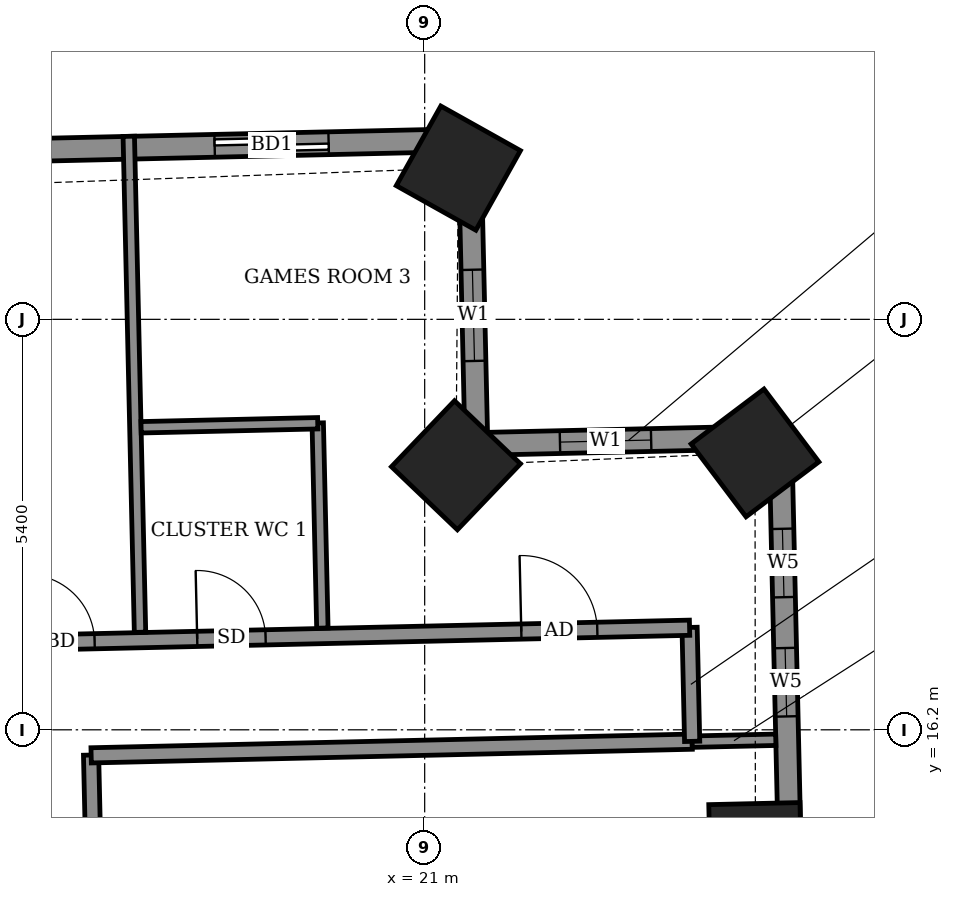
"""IFC4 building model, lengths in metres.
Left out: names, types, materials, properties, quantities, classifications, styles, units other than length and angle.
Written with IfcOpenShell. Run it as: python <this file> out.ifc"""

import sys

from ifc_helpers import new_model, si_unit, direction, frame, frame_2d, origin, origin_2d, place, context, subcontext, project, spatial, rectangle, extrude, element, fill, save


model = new_model("IFC4")
c1 = context("Model", 3, precision=1e-05, world=origin(), true_north=direction((0.0, 1.0)))
c2 = subcontext(c1, "Body", "Model", "MODEL_VIEW")
j1 = project(units=[si_unit("LENGTHUNIT", "METRE"), si_unit("PLANEANGLEUNIT", "RADIAN")], contexts=[c1])
p1 = place(None, origin())
s1 = spatial("IfcSite", under=j1, at=p1, CompositionType="ELEMENT")
p2 = place(p1, origin())
s2 = spatial("IfcBuilding", under=s1, at=p2, CompositionType="ELEMENT")
p3 = place(p2, frame((0.0, 0.0, 175.3)))
s3 = spatial("IfcBuildingStorey", under=s2, at=p3, CompositionType="ELEMENT", Elevation=175.3)
for number, where, z_axis, x_axis in (
    (1, (25.351, 14.629, -0.55), (0.0, 0.0, 1.0), (-0.023, 1.0, 0.0)),
    (2, (25.346, 19.843, -0.55), (0.0, 0.0, 1.0), (-0.602, 0.798, 0.0)),
    (3, (21.411, 19.68, -0.55), (0.0, 0.0, 1.0), (-0.723, 0.691, 0.0)),
    (4, (21.443, 23.589, -0.55), (0.0, 0.0, 1.0), (-0.873, 0.488, 0.0)),
):
    element("IfcColumn", number, at=place(p3, frame(where, z_axis=z_axis, x_axis=x_axis)), inside=s3, PredefinedType="COLUMN", context=c2, shape_type="SweptSolid", body=[
        extrude(rectangle(XDim=1.2, YDim=1.2, at=origin_2d()), origin(), (0.0, 0.0, 1.0), 3.6),
    ])
p4 = place(p3, frame((25.929, 9.025, 0.0), z_axis=(0.0, 0.0, 1.0), x_axis=(-0.022667601583, 0.999743056909, 0.0)))
e5 = element("IfcWall", 5, at=p4, inside=s3, PredefinedType="SOLIDWALL", context=c2, shape_type="SweptSolid", body=[
    extrude(rectangle(XDim=11.029, YDim=0.3, at=frame_2d((5.515, 0.0))), origin(), (0.0, 0.0, 1.0), 3.05),
])
p5 = place(p4, frame((2.086, 0.0, 0.0)))
e6 = element("IfcOpeningElement", 6, at=p5, cuts=e5, PredefinedType="OPENING", context=c2, shape_type="SweptSolid", body=[
    extrude(rectangle(XDim=1.5, YDim=2.4, at=frame_2d((0.75, 1.2))), frame((0.0, 0.16, 0.0), z_axis=(0.0, -1.0, 0.0), x_axis=(1.0, 0.0, 0.0)), (0.0, 0.0, 1.0), 0.32),
])
p6 = place(p4, frame((7.353, 0.0, 0.9)))
e7 = element("IfcOpeningElement", 7, at=p6, cuts=e5, PredefinedType="OPENING", context=c2, shape_type="SweptSolid", body=[
    extrude(rectangle(XDim=0.9, YDim=1.5, at=frame_2d((0.45, 0.75))), frame((0.0, 0.16, 0.0), z_axis=(0.0, -1.0, 0.0), x_axis=(1.0, 0.0, 0.0)), (0.0, 0.0, 1.0), 0.32),
])
p7 = place(p4, frame((8.922, 0.0, 0.9)))
e8 = element("IfcOpeningElement", 8, at=p7, cuts=e5, PredefinedType="OPENING", context=c2, shape_type="SweptSolid", body=[
    extrude(rectangle(XDim=0.9, YDim=1.5, at=frame_2d((0.45, 0.75))), frame((0.0, 0.16, 0.0), z_axis=(0.0, -1.0, 0.0), x_axis=(1.0, 0.0, 0.0)), (0.0, 0.0, 1.0), 0.32),
])
p8 = place(p3, frame((25.679, 20.051, 0.0), z_axis=(0.0, 0.0, 1.0), x_axis=(-0.999740826251, -0.022765770952, 0.0)))
e9 = element("IfcWall", 9, at=p8, inside=s3, PredefinedType="SOLIDWALL", context=c2, shape_type="SweptSolid", body=[
    extrude(rectangle(XDim=4.0, YDim=0.3, at=frame_2d((2.0, 0.0))), origin(), (0.0, 0.0, 1.0), 2.55),
])
p9 = place(p8, frame((1.7, 0.0, 0.9)))
e10 = element("IfcOpeningElement", 10, at=p9, cuts=e9, PredefinedType="OPENING", context=c2, shape_type="SweptSolid", body=[
    extrude(rectangle(XDim=1.2, YDim=1.5, at=frame_2d((0.6, 0.75))), frame((0.0, 0.16, 0.0), z_axis=(0.0, -1.0, 0.0), x_axis=(1.0, 0.0, 0.0)), (0.0, 0.0, 1.0), 0.32),
])
p10 = place(p3, frame((21.68, 19.96, 0.0), z_axis=(0.0, 0.0, 1.0), x_axis=(-0.022704768219, 0.999742213523, 0.0)))
e11 = element("IfcWall", 11, at=p10, inside=s3, PredefinedType="SOLIDWALL", context=c2, shape_type="SweptSolid", body=[
    extrude(rectangle(XDim=4.0, YDim=0.3, at=frame_2d((2.0, 0.0))), origin(), (0.0, 0.0, 1.0), 2.55),
])
p11 = place(p10, frame((1.093, 0.0, 0.9)))
e12 = element("IfcOpeningElement", 12, at=p11, cuts=e11, PredefinedType="OPENING", context=c2, shape_type="SweptSolid", body=[
    extrude(rectangle(XDim=1.2, YDim=1.5, at=frame_2d((0.6, 0.75))), frame((0.0, 0.16, 0.0), z_axis=(0.0, -1.0, 0.0), x_axis=(1.0, 0.0, 0.0)), (0.0, 0.0, 1.0), 0.32),
])
p12 = place(p3, frame((21.589, 23.959, 0.0), z_axis=(0.0, 0.0, 1.0), x_axis=(-0.999742671382, -0.022684598702, 0.0)))
e13 = element("IfcWall", 13, at=p12, inside=s3, PredefinedType="SOLIDWALL", context=c2, shape_type="SweptSolid", body=[
    extrude(rectangle(XDim=40.381, YDim=0.3, at=frame_2d((20.19, 0.0))), origin(), (0.0, 0.0, 1.0), 3.05),
])
p13 = place(p12, frame((1.853, 0.0, 0.0)))
e14 = element("IfcOpeningElement", 14, at=p13, cuts=e13, PredefinedType="OPENING", context=c2, shape_type="SweptSolid", body=[
    extrude(rectangle(XDim=1.5, YDim=2.4, at=frame_2d((0.75, 1.2))), frame((0.0, 0.16, 0.0), z_axis=(0.0, -1.0, 0.0), x_axis=(1.0, 0.0, 0.0)), (0.0, 0.0, 1.0), 0.32),
])
p14 = place(p12, frame((7.38, 0.0, 0.0)))
e15 = element("IfcOpeningElement", 15, at=p14, cuts=e13, PredefinedType="OPENING", context=c2, shape_type="SweptSolid", body=[
    extrude(rectangle(XDim=1.2, YDim=2.4, at=frame_2d((0.6, 1.2))), frame((0.0, 0.16, 0.0), z_axis=(0.0, -1.0, 0.0), x_axis=(1.0, 0.0, 0.0)), (0.0, 0.0, 1.0), 0.32),
])
p15 = place(p12, frame((10.27, 0.0, 0.0)))
e16 = element("IfcOpeningElement", 16, at=p15, cuts=e13, PredefinedType="OPENING", context=c2, shape_type="SweptSolid", body=[
    extrude(rectangle(XDim=1.5, YDim=2.4, at=frame_2d((0.75, 1.2))), frame((0.0, 0.16, 0.0), z_axis=(0.0, -1.0, 0.0), x_axis=(1.0, 0.0, 0.0)), (0.0, 0.0, 1.0), 0.32),
])
p16 = place(p12, frame((15.095, 0.0, 0.0)))
e17 = element("IfcOpeningElement", 17, at=p16, cuts=e13, PredefinedType="OPENING", context=c2, shape_type="SweptSolid", body=[
    extrude(rectangle(XDim=1.5, YDim=2.4, at=frame_2d((0.75, 1.2))), frame((0.0, 0.16, 0.0), z_axis=(0.0, -1.0, 0.0), x_axis=(1.0, 0.0, 0.0)), (0.0, 0.0, 1.0), 0.32),
])
p17 = place(p12, frame((20.935, 0.0, 0.0)))
e18 = element("IfcOpeningElement", 18, at=p17, cuts=e13, PredefinedType="OPENING", context=c2, shape_type="SweptSolid", body=[
    extrude(rectangle(XDim=1.2, YDim=2.4, at=frame_2d((0.6, 1.2))), frame((0.0, 0.16, 0.0), z_axis=(0.0, -1.0, 0.0), x_axis=(1.0, 0.0, 0.0)), (0.0, 0.0, 1.0), 0.32),
])
p18 = place(p12, frame((23.825, 0.0, 0.0)))
e19 = element("IfcOpeningElement", 19, at=p18, cuts=e13, PredefinedType="OPENING", context=c2, shape_type="SweptSolid", body=[
    extrude(rectangle(XDim=1.5, YDim=2.4, at=frame_2d((0.75, 1.2))), frame((0.0, 0.16, 0.0), z_axis=(0.0, -1.0, 0.0), x_axis=(1.0, 0.0, 0.0)), (0.0, 0.0, 1.0), 0.32),
])
p19 = place(p12, frame((28.65, 0.0, 0.0)))
e20 = element("IfcOpeningElement", 20, at=p19, cuts=e13, PredefinedType="OPENING", context=c2, shape_type="SweptSolid", body=[
    extrude(rectangle(XDim=1.5, YDim=2.4, at=frame_2d((0.75, 1.2))), frame((0.0, 0.16, 0.0), z_axis=(0.0, -1.0, 0.0), x_axis=(1.0, 0.0, 0.0)), (0.0, 0.0, 1.0), 0.32),
])
p20 = place(p12, frame((31.84, 0.0, 0.0)))
e21 = element("IfcOpeningElement", 21, at=p20, cuts=e13, PredefinedType="OPENING", context=c2, shape_type="SweptSolid", body=[
    extrude(rectangle(XDim=1.2, YDim=2.4, at=frame_2d((0.6, 1.2))), frame((0.0, 0.16, 0.0), z_axis=(0.0, -1.0, 0.0), x_axis=(1.0, 0.0, 0.0)), (0.0, 0.0, 1.0), 0.32),
])
p21 = place(p12, frame((36.57, 0.0, 0.9)))
e22 = element("IfcOpeningElement", 22, at=p21, cuts=e13, PredefinedType="OPENING", context=c2, shape_type="SweptSolid", body=[
    extrude(rectangle(XDim=2.4, YDim=1.5, at=frame_2d((1.2, 0.75))), frame((0.0, 0.16, 0.0), z_axis=(0.0, -1.0, 0.0), x_axis=(1.0, 0.0, 0.0)), (0.0, 0.0, 1.0), 0.32),
])
p22 = place(p3, frame((16.797, 7.674, 0.0), z_axis=(0.0, 0.0, 1.0), x_axis=(-0.022698399288, 0.999742358145, 0.0)))
e23 = element("IfcWall", 23, at=p22, inside=s3, PredefinedType="PARTITIONING", context=c2, shape_type="SweptSolid", body=[
    extrude(rectangle(XDim=8.196, YDim=0.2, at=frame_2d((4.098, 0.0))), origin(), (0.0, 0.0, 1.0), 3.05),
])
p23 = place(p22, frame((3.683, 0.0, 0.0)))
e24 = element("IfcOpeningElement", 24, at=p23, cuts=e23, PredefinedType="OPENING", context=c2, shape_type="SweptSolid", body=[
    extrude(rectangle(XDim=1.0, YDim=2.1, at=frame_2d((0.5, 1.05))), frame((0.0, 0.11, 0.0), z_axis=(0.0, -1.0, 0.0), x_axis=(1.0, 0.0, 0.0)), (0.0, 0.0, 1.0), 0.22),
])
p24 = place(p3, frame((16.612, 15.864, 0.0), z_axis=(0.0, 0.0, 1.0), x_axis=(0.999741181744, 0.022750154412, 0.0)))
e25 = element("IfcWall", 25, at=p24, inside=s3, PredefinedType="PARTITIONING", context=c2, shape_type="SweptSolid", body=[
    extrude(rectangle(XDim=7.909, YDim=0.2, at=frame_2d((3.955, 0.0))), origin(), (0.0, 0.0, 1.0), 3.05),
])
p25 = place(p3, frame((24.519, 16.044, 0.0), z_axis=(0.0, 0.0, 1.0), x_axis=(0.999738732953, 0.022857511541, 0.0)))
e26 = element("IfcWall", 26, at=p25, inside=s3, PredefinedType="PARTITIONING", context=c2, shape_type="SweptSolid", body=[
    extrude(rectangle(XDim=1.1, YDim=0.15, at=frame_2d((0.55, 0.0))), origin(), (0.0, 0.0, 1.0), 2.55),
])
p26 = place(p3, frame((24.519, 16.048, 0.0), z_axis=(0.0, 0.0, 1.0), x_axis=(-0.022632637625, 0.99974384905, 0.0)))
e27 = element("IfcWall", 27, at=p26, inside=s3, PredefinedType="PARTITIONING", context=c2, shape_type="SweptSolid", body=[
    extrude(rectangle(XDim=1.5, YDim=0.2, at=frame_2d((0.75, 0.0))), origin(), (0.0, 0.0, 1.0), 3.05),
])
p27 = place(p3, frame((14.88, 17.325, 0.0), z_axis=(0.0, 0.0, 1.0), x_axis=(0.999742504166, 0.022691966963, 0.0)))
e28 = element("IfcWall", 28, at=p27, inside=s3, PredefinedType="PARTITIONING", context=c2, shape_type="SweptSolid", body=[
    extrude(rectangle(XDim=9.608, YDim=0.2, at=frame_2d((4.804, 0.0))), origin(), (0.0, 0.0, 1.0), 3.05),
])
p28 = place(p27, frame((7.393, 0.0, 0.0)))
e29 = element("IfcOpeningElement", 29, at=p28, cuts=e28, PredefinedType="OPENING", context=c2, shape_type="SweptSolid", body=[
    extrude(rectangle(XDim=1.0, YDim=2.1, at=frame_2d((0.5, 1.05))), frame((0.0, 0.11, 0.0), z_axis=(0.0, -1.0, 0.0), x_axis=(1.0, 0.0, 0.0)), (0.0, 0.0, 1.0), 0.22),
])
p29 = place(p27, frame((3.128, 0.0, 0.0)))
e30 = element("IfcOpeningElement", 30, at=p29, cuts=e28, PredefinedType="OPENING", context=c2, shape_type="SweptSolid", body=[
    extrude(rectangle(XDim=0.9, YDim=2.1, at=frame_2d((0.45, 1.05))), frame((0.0, 0.11, 0.0), z_axis=(0.0, -1.0, 0.0), x_axis=(1.0, 0.0, 0.0)), (0.0, 0.0, 1.0), 0.22),
])
p30 = place(p27, frame((0.878, 0.0, 0.0)))
e31 = element("IfcOpeningElement", 31, at=p30, cuts=e28, PredefinedType="OPENING", context=c2, shape_type="SweptSolid", body=[
    extrude(rectangle(XDim=0.9, YDim=2.1, at=frame_2d((0.45, 1.05))), frame((0.0, 0.11, 0.0), z_axis=(0.0, -1.0, 0.0), x_axis=(1.0, 0.0, 0.0)), (0.0, 0.0, 1.0), 0.22),
])
p31 = place(p3, frame((17.255, 17.483, 0.0), z_axis=(0.0, 0.0, 1.0), x_axis=(-0.022667874761, 0.999743050715, 0.0)))
e32 = element("IfcWall", 32, at=p31, inside=s3, PredefinedType="PARTITIONING", context=c2, shape_type="SweptSolid", body=[
    extrude(rectangle(XDim=6.527, YDim=0.15, at=frame_2d((3.263, 0.0))), origin(), (0.0, 0.0, 1.0), 2.55),
])
p32 = place(p3, frame((19.654, 17.538, 0.0), z_axis=(0.0, 0.0, 1.0), x_axis=(-0.02260842146, 0.999744396973, 0.0)))
e33 = element("IfcWall", 33, at=p32, inside=s3, PredefinedType="PARTITIONING", context=c2, shape_type="SweptSolid", body=[
    extrude(rectangle(XDim=2.7, YDim=0.15, at=frame_2d((1.35, 0.0))), origin(), (0.0, 0.0, 1.0), 3.05),
])
p33 = place(p3, frame((17.269, 20.18, 0.0), z_axis=(0.0, 0.0, 1.0), x_axis=(0.999740260747, 0.02279059109, 0.0)))
e34 = element("IfcWall", 34, at=p33, inside=s3, PredefinedType="PARTITIONING", context=c2, shape_type="SweptSolid", body=[
    extrude(rectangle(XDim=2.324, YDim=0.15, at=frame_2d((1.162, 0.0))), origin(), (0.0, 0.0, 1.0), 3.05),
])
p34 = place(p6, origin())
e35 = element("IfcWindow", 35, at=p34, inside=s3, PartitioningType="SINGLE_PANEL", PredefinedType="WINDOW", context=c2, shape_type="SweptSolid", body=[
    extrude(rectangle(XDim=0.9, YDim=1.5, at=frame_2d((0.45, 0.75))), frame((0.0, 0.03, 0.0), z_axis=(0.0, -1.0, 0.0), x_axis=(1.0, 0.0, 0.0)), (0.0, 0.0, 1.0), 0.06),
])
fill(e7, e35)
p35 = place(p7, origin())
e36 = element("IfcWindow", 36, at=p35, inside=s3, PartitioningType="SINGLE_PANEL", PredefinedType="WINDOW", context=c2, shape_type="SweptSolid", body=[
    extrude(rectangle(XDim=0.9, YDim=1.5, at=frame_2d((0.45, 0.75))), frame((0.0, 0.03, 0.0), z_axis=(0.0, -1.0, 0.0), x_axis=(1.0, 0.0, 0.0)), (0.0, 0.0, 1.0), 0.06),
])
fill(e8, e36)
p36 = place(p9, origin())
e37 = element("IfcWindow", 37, at=p36, inside=s3, PartitioningType="SINGLE_PANEL", PredefinedType="WINDOW", context=c2, shape_type="SweptSolid", body=[
    extrude(rectangle(XDim=1.2, YDim=1.5, at=frame_2d((0.6, 0.75))), frame((0.0, 0.03, 0.0), z_axis=(0.0, -1.0, 0.0), x_axis=(1.0, 0.0, 0.0)), (0.0, 0.0, 1.0), 0.06),
])
fill(e10, e37)
p37 = place(p11, origin())
e38 = element("IfcWindow", 38, at=p37, inside=s3, PartitioningType="SINGLE_PANEL", PredefinedType="WINDOW", context=c2, shape_type="SweptSolid", body=[
    extrude(rectangle(XDim=1.2, YDim=1.5, at=frame_2d((0.6, 0.75))), frame((0.0, 0.03, 0.0), z_axis=(0.0, -1.0, 0.0), x_axis=(1.0, 0.0, 0.0)), (0.0, 0.0, 1.0), 0.06),
])
fill(e12, e38)
p38 = place(p13, origin())
e39 = element("IfcDoor", 39, at=p38, inside=s3, OperationType="SLIDING_TO_LEFT", PredefinedType="DOOR", context=c2, shape_type="SweptSolid", body=[
    extrude(rectangle(XDim=1.5, YDim=2.4, at=frame_2d((0.75, 1.2))), frame((0.0, 0.025, 0.0), z_axis=(0.0, -1.0, 0.0), x_axis=(1.0, 0.0, 0.0)), (0.0, 0.0, 1.0), 0.05),
])
fill(e14, e39)
p39 = place(p28, origin())
e40 = element("IfcDoor", 40, at=p39, inside=s3, OperationType="SINGLE_SWING_LEFT", PredefinedType="DOOR", context=c2, shape_type="SweptSolid", body=[
    extrude(rectangle(XDim=1.0, YDim=2.1, at=frame_2d((0.5, 1.05))), frame((0.0, 0.025, 0.0), z_axis=(0.0, -1.0, 0.0), x_axis=(1.0, 0.0, 0.0)), (0.0, 0.0, 1.0), 0.05),
])
fill(e29, e40)
p40 = place(p29, origin())
e41 = element("IfcDoor", 41, at=p40, inside=s3, OperationType="SINGLE_SWING_LEFT", PredefinedType="DOOR", context=c2, shape_type="SweptSolid", body=[
    extrude(rectangle(XDim=0.9, YDim=2.1, at=frame_2d((0.45, 1.05))), frame((0.0, 0.025, 0.0), z_axis=(0.0, -1.0, 0.0), x_axis=(1.0, 0.0, 0.0)), (0.0, 0.0, 1.0), 0.05),
])
fill(e30, e41)
p41 = place(p30, origin())
e42 = element("IfcDoor", 42, at=p41, inside=s3, OperationType="SINGLE_SWING_RIGHT", PredefinedType="DOOR", context=c2, shape_type="SweptSolid", body=[
    extrude(rectangle(XDim=0.9, YDim=2.1, at=frame_2d((0.45, 1.05))), frame((0.0, 0.025, 0.0), z_axis=(0.0, -1.0, 0.0), x_axis=(1.0, 0.0, 0.0)), (0.0, 0.0, 1.0), 0.05),
])
fill(e31, e42)
save(model, sys.argv[1])
